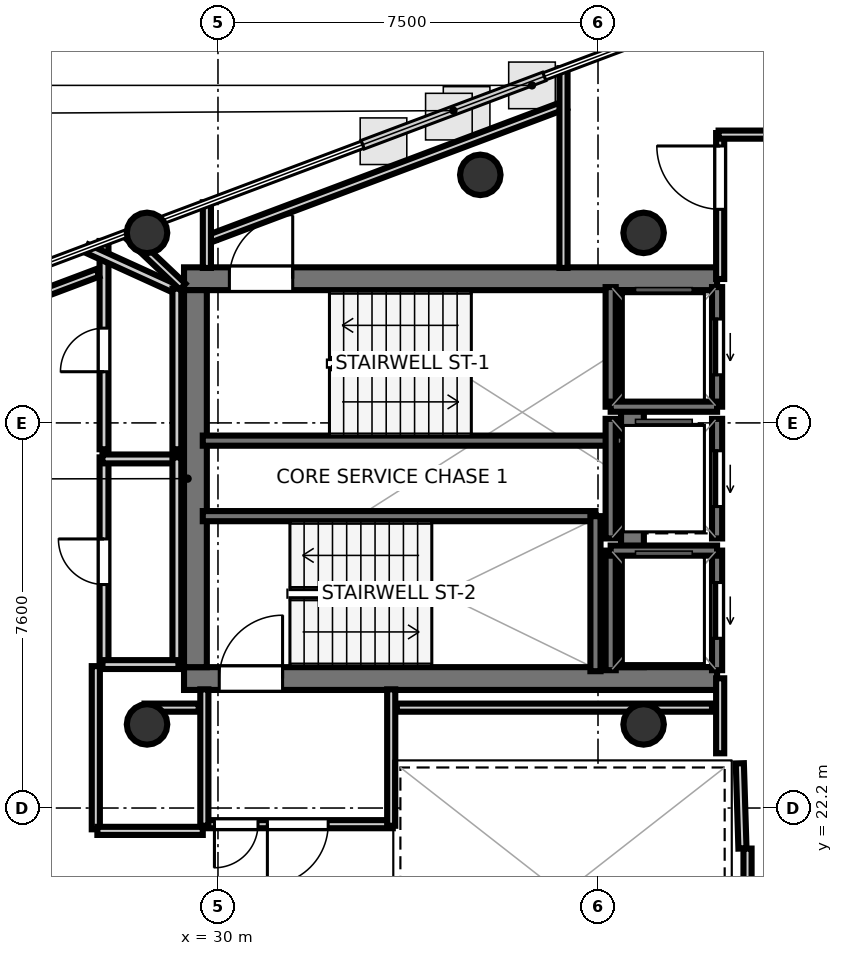
"""IFC4 building model, lengths in metres.
Left out: names, types, materials, properties, quantities, classifications, styles, units other than length and angle.
Written with IfcOpenShell. Run it as: python <this file> out.ifc"""

import sys

from ifc_helpers import new_model, si_unit, direction, frame, frame_2d, origin, origin_2d, place, context, subcontext, project, spatial, rectangle, hollow_circle, extrude, element, fill, save


model = new_model("IFC4")
c1 = context("Model", 3, precision=1e-05, world=origin(), true_north=direction((0.0, 1.0)))
c2 = subcontext(c1, "Body", "Model", "MODEL_VIEW")
j1 = project(units=[si_unit("LENGTHUNIT", "METRE"), si_unit("PLANEANGLEUNIT", "RADIAN")], contexts=[c1])
p1 = place(None, origin())
s1 = spatial("IfcSite", under=j1, at=p1, CompositionType="ELEMENT")
p2 = place(p1, origin())
s2 = spatial("IfcBuilding", under=s1, at=p2, CompositionType="ELEMENT")
p3 = place(p2, frame((0.0, 0.0, 340.7)))
s3 = spatial("IfcBuildingStorey", under=s2, at=p3, CompositionType="ELEMENT", Elevation=340.7)
p4 = place(p3, frame((29.33, 32.645, 0.0), z_axis=(0.0, 0.0, 1.0), x_axis=(1.0, 0.0, 0.0)))
e1 = element("IfcWall", 1, at=p4, inside=s3, PredefinedType="SHEAR", context=c2, shape_type="SweptSolid", body=[
    extrude(rectangle(XDim=10.52, YDim=0.45, at=frame_2d((5.26, 0.0))), origin(), (0.0, 0.0, 1.0), 3.52),
])
p5 = place(p4, frame((0.895, 0.0, 0.0)))
e2 = element("IfcOpeningElement", 2, at=p5, cuts=e1, PredefinedType="OPENING", context=c2, shape_type="SweptSolid", body=[
    extrude(rectangle(XDim=1.25, YDim=2.15, at=frame_2d((0.625, 1.075))), frame((0.0, 0.235, 0.0), z_axis=(0.0, -1.0, 0.0), x_axis=(1.0, 0.0, 0.0)), (0.0, 0.0, 1.0), 0.47),
])
p6 = place(p3, frame((29.33, 24.755, 0.0), z_axis=(0.0, 0.0, 1.0), x_axis=(1.0, 0.0, 0.0)))
e3 = element("IfcWall", 3, at=p6, inside=s3, PredefinedType="SHEAR", context=c2, shape_type="SweptSolid", body=[
    extrude(rectangle(XDim=10.52, YDim=0.45, at=frame_2d((5.26, 0.0))), origin(), (0.0, 0.0, 1.0), 3.52),
])
p7 = place(p6, frame((0.695, 0.0, 0.0)))
e4 = element("IfcOpeningElement", 4, at=p7, cuts=e3, PredefinedType="OPENING", context=c2, shape_type="SweptSolid", body=[
    extrude(rectangle(XDim=1.25, YDim=2.15, at=frame_2d((0.625, 1.075))), frame((0.0, 0.235, 0.0), z_axis=(0.0, -1.0, 0.0), x_axis=(1.0, 0.0, 0.0)), (0.0, 0.0, 1.0), 0.47),
])
for number, where, z_axis, x_axis in (
    (5, (29.555, 24.98, 0.0), (0.0, 0.0, 1.0), (0.0, 1.0, 0.0)),
    (6, (38.18, 24.98, 0.0), (0.0, 0.0, 1.0), (0.0, 1.0, 0.0)),
):
    element("IfcWall", number, at=place(p3, frame(where, z_axis=z_axis, x_axis=x_axis)), inside=s3, PredefinedType="SHEAR", context=c2, shape_type="SweptSolid", body=[
        extrude(rectangle(XDim=7.44, YDim=0.45, at=frame_2d((3.72, 0.0))), origin(), (0.0, 0.0, 1.0), 3.52),
    ])
for number, where, z_axis, x_axis in (
    (7, (28.6, 33.55, 0.0), (0.0, 0.0, 1.0), (1.0, 0.0, 0.0)),
    (8, (28.6, 23.85, 0.0), (0.0, 0.0, 1.0), (1.0, 0.0, 0.0)),
    (9, (38.4, 33.55, 0.0), (0.0, 0.0, 1.0), (1.0, 0.0, 0.0)),
    (10, (38.4, 23.85, 0.0), (0.0, 0.0, 1.0), (1.0, 0.0, 0.0)),
    (11, (35.177, 34.695, 0.0), (0.0, 0.0, 1.0), (1.0, 0.0, 0.0)),
):
    element("IfcColumn", number, at=place(p3, frame(where, z_axis=z_axis, x_axis=x_axis)), inside=s3, PredefinedType="COLUMN", context=c2, shape_type="SweptSolid", body=[
        extrude(hollow_circle(Radius=0.4, WallThickness=0.022, at=origin_2d()), origin(), (0.0, 0.0, 1.0), 3.7),
    ])
p8 = place(p3, frame((29.7, 29.45, 0.0), z_axis=(0.0, 0.0, 1.0), x_axis=(1.0, 0.0, 0.0)))
e12 = element("IfcWall", 12, at=p8, inside=s3, PredefinedType="SOLIDWALL", context=c2, shape_type="SweptSolid", body=[
    extrude(rectangle(XDim=8.3, YDim=0.2, at=frame_2d((4.15, 0.0))), origin(), (0.0, 0.0, 1.0), 3.52),
])
p9 = place(p3, frame((29.7, 27.96, 0.0), z_axis=(0.0, 0.0, 1.0), x_axis=(1.0, 0.0, 0.0)))
e13 = element("IfcWall", 13, at=p9, inside=s3, PredefinedType="SOLIDWALL", context=c2, shape_type="SweptSolid", body=[
    extrude(rectangle(XDim=7.75, YDim=0.2, at=frame_2d((3.875, 0.0))), origin(), (0.0, 0.0, 1.0), 3.52),
])
p10 = place(p3, frame((37.45, 24.9, 0.0), z_axis=(0.0, 0.0, 1.0), x_axis=(0.0, 1.0, 0.0)))
e14 = element("IfcWall", 14, at=p10, inside=s3, PredefinedType="SOLIDWALL", context=c2, shape_type="SweptSolid", body=[
    extrude(rectangle(XDim=3.06, YDim=0.2, at=frame_2d((1.53, 0.0))), origin(), (0.0, 0.0, 1.0), 3.52),
])
p11 = place(p3, frame((39.85, 30.12, 0.0), z_axis=(0.0, 0.0, 1.0), x_axis=(0.0, 1.0, 0.0)))
e15 = element("IfcWall", 15, at=p11, inside=s3, PredefinedType="SOLIDWALL", context=c2, shape_type="SweptSolid", body=[
    extrude(rectangle(XDim=2.36, YDim=0.2, at=frame_2d((1.18, 0.0))), origin(), (0.0, 0.0, 1.0), 3.52),
])
p12 = place(p11, frame((0.63, 0.0, 0.0)))
e16 = element("IfcOpeningElement", 16, at=p12, cuts=e15, PredefinedType="OPENING", context=c2, shape_type="SweptSolid", body=[
    extrude(rectangle(XDim=1.1, YDim=2.15, at=frame_2d((0.55, 1.075))), frame((0.0, 0.11, 0.0), z_axis=(0.0, -1.0, 0.0), x_axis=(1.0, 0.0, 0.0)), (0.0, 0.0, 1.0), 0.22),
])
p13 = place(p3, frame((37.75, 30.12, 0.0), z_axis=(0.0, 0.0, 1.0), x_axis=(0.0, 1.0, 0.0)))
e17 = element("IfcWall", 17, at=p13, inside=s3, PredefinedType="SOLIDWALL", context=c2, shape_type="SweptSolid", body=[
    extrude(rectangle(XDim=2.36, YDim=0.2, at=frame_2d((1.18, 0.0))), origin(), (0.0, 0.0, 1.0), 3.52),
])
p14 = place(p3, frame((37.75, 30.12, 0.0), z_axis=(0.0, 0.0, 1.0), x_axis=(1.0, 0.0, 0.0)))
e18 = element("IfcWall", 18, at=p14, inside=s3, PredefinedType="SOLIDWALL", context=c2, shape_type="SweptSolid", body=[
    extrude(rectangle(XDim=2.1, YDim=0.2, at=frame_2d((1.05, 0.0))), origin(), (0.0, 0.0, 1.0), 3.52),
])
p15 = place(p3, frame((39.85, 24.92, 0.0), z_axis=(0.0, 0.0, 1.0), x_axis=(0.0, 1.0, 0.0)))
e19 = element("IfcWall", 19, at=p15, inside=s3, PredefinedType="SOLIDWALL", context=c2, shape_type="SweptSolid", body=[
    extrude(rectangle(XDim=2.36, YDim=0.2, at=frame_2d((1.18, 0.0))), origin(), (0.0, 0.0, 1.0), 3.52),
])
p16 = place(p15, frame((0.63, 0.0, 0.0)))
e20 = element("IfcOpeningElement", 20, at=p16, cuts=e19, PredefinedType="OPENING", context=c2, shape_type="SweptSolid", body=[
    extrude(rectangle(XDim=1.1, YDim=2.15, at=frame_2d((0.55, 1.075))), frame((0.0, 0.11, 0.0), z_axis=(0.0, -1.0, 0.0), x_axis=(1.0, 0.0, 0.0)), (0.0, 0.0, 1.0), 0.22),
])
p17 = place(p3, frame((37.75, 24.92, 0.0), z_axis=(0.0, 0.0, 1.0), x_axis=(0.0, 1.0, 0.0)))
e21 = element("IfcWall", 21, at=p17, inside=s3, PredefinedType="SOLIDWALL", context=c2, shape_type="SweptSolid", body=[
    extrude(rectangle(XDim=2.36, YDim=0.2, at=frame_2d((1.18, 0.0))), origin(), (0.0, 0.0, 1.0), 3.52),
])
p18 = place(p3, frame((37.75, 27.28, 0.0), z_axis=(0.0, 0.0, 1.0), x_axis=(1.0, 0.0, 0.0)))
e22 = element("IfcWall", 22, at=p18, inside=s3, PredefinedType="SOLIDWALL", context=c2, shape_type="SweptSolid", body=[
    extrude(rectangle(XDim=2.1, YDim=0.2, at=frame_2d((1.05, 0.0))), origin(), (0.0, 0.0, 1.0), 3.52),
])
p19 = place(p3, frame((39.85, 27.52, 0.0), z_axis=(0.0, 0.0, 1.0), x_axis=(0.0, 1.0, 0.0)))
e23 = element("IfcWall", 23, at=p19, inside=s3, PredefinedType="SOLIDWALL", context=c2, shape_type="SweptSolid", body=[
    extrude(rectangle(XDim=2.36, YDim=0.2, at=frame_2d((1.18, 0.0))), origin(), (0.0, 0.0, 1.0), 3.52),
])
p20 = place(p19, frame((0.63, 0.0, 0.0)))
e24 = element("IfcOpeningElement", 24, at=p20, cuts=e23, PredefinedType="OPENING", context=c2, shape_type="SweptSolid", body=[
    extrude(rectangle(XDim=1.1, YDim=2.15, at=frame_2d((0.55, 1.075))), frame((0.0, 0.11, 0.0), z_axis=(0.0, -1.0, 0.0), x_axis=(1.0, 0.0, 0.0)), (0.0, 0.0, 1.0), 0.22),
])
p21 = place(p3, frame((37.75, 27.52, 0.0), z_axis=(0.0, 0.0, 1.0), x_axis=(0.0, 1.0, 0.0)))
e25 = element("IfcWall", 25, at=p21, inside=s3, PredefinedType="SOLIDWALL", context=c2, shape_type="SweptSolid", body=[
    extrude(rectangle(XDim=2.36, YDim=0.2, at=frame_2d((1.18, 0.0))), origin(), (0.0, 0.0, 1.0), 3.52),
])
p22 = place(p3, frame((29.761, 33.409, 0.0), z_axis=(0.0, 0.0, 1.0), x_axis=(0.936004712995, 0.351987467464, 0.0)))
e26 = element("IfcWall", 26, at=p22, inside=s3, PredefinedType="PARTITIONING", context=c2, shape_type="SweptSolid", body=[
    extrude(rectangle(XDim=7.585, YDim=0.16, at=frame_2d((3.792, 0.0))), origin(), (0.0, 0.0, 1.0), 2.84),
])
p23 = place(p3, frame((36.819, 36.8, 0.0), z_axis=(0.0, 0.0, 1.0), x_axis=(0.0, -1.0, 0.0)))
e27 = element("IfcWall", 27, at=p23, inside=s3, PredefinedType="PARTITIONING", context=c2, shape_type="SweptSolid", body=[
    extrude(rectangle(XDim=3.942, YDim=0.16, at=frame_2d((1.971, 0.0))), origin(), (0.0, 0.0, 1.0), 2.84),
])
p24 = place(p3, frame((29.781, 32.858, 0.0), z_axis=(0.0, 0.0, 1.0), x_axis=(0.0, 1.0, 0.0)))
e28 = element("IfcWall", 28, at=p24, inside=s3, PredefinedType="PARTITIONING", context=c2, shape_type="SweptSolid", body=[
    extrude(rectangle(XDim=1.296, YDim=0.16, at=frame_2d((0.648, 0.0))), origin(), (0.0, 0.0, 1.0), 2.84),
])
p25 = place(p3, frame((33.45, 21.881, 0.0), z_axis=(0.0, 0.0, 1.0), x_axis=(-1.0, 0.0, 0.0)))
e29 = element("IfcWall", 29, at=p25, inside=s3, PredefinedType="PARTITIONING", context=c2, shape_type="SweptSolid", body=[
    extrude(rectangle(XDim=3.75, YDim=0.16, at=frame_2d((1.875, 0.0))), origin(), (0.0, 0.0, 1.0), 2.84),
])
p26 = place(p25, frame((1.275, 0.0, 0.0)))
e30 = element("IfcOpeningElement", 30, at=p26, cuts=e29, PredefinedType="OPENING", context=c2, shape_type="SweptSolid", body=[
    extrude(rectangle(XDim=1.2, YDim=2.15, at=frame_2d((0.6, 1.075))), frame((0.0, 0.09, 0.0), z_axis=(0.0, -1.0, 0.0), x_axis=(1.0, 0.0, 0.0)), (0.0, 0.0, 1.0), 0.18),
])
p27 = place(p25, frame((2.66, 0.0, 0.0)))
e31 = element("IfcOpeningElement", 31, at=p27, cuts=e29, PredefinedType="OPENING", context=c2, shape_type="SweptSolid", body=[
    extrude(rectangle(XDim=0.86, YDim=2.05, at=frame_2d((0.43, 1.025))), frame((0.0, 0.09, 0.0), z_axis=(0.0, -1.0, 0.0), x_axis=(1.0, 0.0, 0.0)), (0.0, 0.0, 1.0), 0.18),
])
for number, where, z_axis, x_axis in (
    (32, (29.731, 21.85, 0.0), (0.0, 0.0, 1.0), (0.0, 1.0, 0.0)),
    (33, (33.419, 24.542, 0.0), (0.0, 0.0, 1.0), (0.0, -1.0, 0.0)),
):
    element("IfcWall", number, at=place(p3, frame(where, z_axis=z_axis, x_axis=x_axis)), inside=s3, PredefinedType="PARTITIONING", context=c2, shape_type="SweptSolid", body=[
        extrude(rectangle(XDim=2.692, YDim=0.16, at=frame_2d((1.346, 0.0))), origin(), (0.0, 0.0, 1.0), 2.84),
    ])
p28 = place(p3, frame((40.351, 21.401, 0.0), z_axis=(0.0, 0.0, 1.0), x_axis=(-0.031058045979, 0.999517582527, 0.0)))
e34 = element("IfcWall", 34, at=p28, inside=s3, PredefinedType="PARTITIONING", context=c2, shape_type="SweptSolid", body=[
    extrude(rectangle(XDim=1.682, YDim=0.16, at=frame_2d((0.841, 0.0))), origin(), (0.0, 0.0, 1.0), 2.84),
])
p29 = place(p3, frame((39.911, 23.28, 0.0), z_axis=(0.0, 0.0, 1.0), x_axis=(0.0, 1.0, 0.0)))
e35 = element("IfcWall", 35, at=p29, inside=s3, PredefinedType="PARTITIONING", context=c2, shape_type="SweptSolid", body=[
    extrude(rectangle(XDim=1.48, YDim=0.16, at=frame_2d((0.74, 0.0))), origin(), (0.0, 0.0, 1.0), 2.84),
])
p30 = place(p3, frame((39.911, 32.64, 0.0), z_axis=(0.0, 0.0, 1.0), x_axis=(0.0, 1.0, 0.0)))
e36 = element("IfcWall", 36, at=p30, inside=s3, PredefinedType="PARTITIONING", context=c2, shape_type="SweptSolid", body=[
    extrude(rectangle(XDim=2.88, YDim=0.16, at=frame_2d((1.44, 0.0))), origin(), (0.0, 0.0, 1.0), 2.84),
])
p31 = place(p30, frame((1.375, 0.0, 0.0)))
e37 = element("IfcOpeningElement", 37, at=p31, cuts=e36, PredefinedType="OPENING", context=c2, shape_type="SweptSolid", body=[
    extrude(rectangle(XDim=1.25, YDim=2.2, at=frame_2d((0.625, 1.1))), frame((0.0, 0.09, 0.0), z_axis=(0.0, -1.0, 0.0), x_axis=(1.0, 0.0, 0.0)), (0.0, 0.0, 1.0), 0.18),
])
p32 = place(p3, frame((39.88, 35.489, 0.0), z_axis=(0.0, 0.0, 1.0), x_axis=(1.0, 0.0, 0.0)))
e38 = element("IfcWall", 38, at=p32, inside=s3, PredefinedType="PARTITIONING", context=c2, shape_type="SweptSolid", body=[
    extrude(rectangle(XDim=1.48, YDim=0.16, at=frame_2d((0.74, 0.0))), origin(), (0.0, 0.0, 1.0), 2.84),
])
p33 = place(p3, frame((40.451, 18.08, 0.0), z_axis=(0.0, 0.0, 1.0), x_axis=(0.0, 1.0, 0.0)))
e39 = element("IfcWall", 39, at=p33, inside=s3, PredefinedType="PARTITIONING", context=c2, shape_type="SweptSolid", body=[
    extrude(rectangle(XDim=3.32, YDim=0.16, at=frame_2d((1.66, 0.0))), origin(), (0.0, 0.0, 1.0), 2.84),
])
p34 = place(p3, frame((27.751, 25.0, 0.0), z_axis=(0.0, 0.0, 1.0), x_axis=(0.0, 1.0, 0.0)))
e40 = element("IfcWall", 40, at=p34, inside=s3, PredefinedType="PLUMBINGWALL", context=c2, shape_type="SweptSolid", body=[
    extrude(rectangle(XDim=4.12, YDim=0.175, at=frame_2d((2.06, 0.0))), origin(), (0.0, 0.0, 1.0), 2.84),
])
p35 = place(p34, frame((1.61, 0.0, 0.0)))
e41 = element("IfcOpeningElement", 41, at=p35, cuts=e40, PredefinedType="OPENING", context=c2, shape_type="SweptSolid", body=[
    extrude(rectangle(XDim=0.9, YDim=2.1, at=frame_2d((0.45, 1.05))), frame((0.0, 0.097, 0.0), z_axis=(0.0, -1.0, 0.0), x_axis=(1.0, 0.0, 0.0)), (0.0, 0.0, 1.0), 0.195),
])
p36 = place(p3, frame((27.72, 29.089, 0.0), z_axis=(0.0, 0.0, 1.0), x_axis=(1.0, 0.0, 0.0)))
e42 = element("IfcWall", 42, at=p36, inside=s3, PredefinedType="PLUMBINGWALL", context=c2, shape_type="SweptSolid", body=[
    extrude(rectangle(XDim=1.5, YDim=0.175, at=frame_2d((0.75, 0.0))), origin(), (0.0, 0.0, 1.0), 2.84),
])
p37 = place(p3, frame((29.189, 29.12, 0.0), z_axis=(0.0, 0.0, 1.0), x_axis=(0.0, -1.0, 0.0)))
e43 = element("IfcWall", 43, at=p37, inside=s3, PredefinedType="PLUMBINGWALL", context=c2, shape_type="SweptSolid", body=[
    extrude(rectangle(XDim=4.12, YDim=0.175, at=frame_2d((2.06, 0.0))), origin(), (0.0, 0.0, 1.0), 2.84),
])
p38 = place(p3, frame((29.22, 25.031, 0.0), z_axis=(0.0, 0.0, 1.0), x_axis=(-1.0, 0.0, 0.0)))
e44 = element("IfcWall", 44, at=p38, inside=s3, PredefinedType="PLUMBINGWALL", context=c2, shape_type="SweptSolid", body=[
    extrude(rectangle(XDim=1.5, YDim=0.175, at=frame_2d((0.75, 0.0))), origin(), (0.0, 0.0, 1.0), 2.84),
])
p39 = place(p3, frame((27.751, 29.28, 0.0), z_axis=(0.0, 0.0, 1.0), x_axis=(0.0, 1.0, 0.0)))
e45 = element("IfcWall", 45, at=p39, inside=s3, PredefinedType="PLUMBINGWALL", context=c2, shape_type="SweptSolid", body=[
    extrude(rectangle(XDim=4.11, YDim=0.175, at=frame_2d((2.055, 0.0))), origin(), (0.0, 0.0, 1.0), 2.84),
])
p40 = place(p39, frame((1.53, 0.0, 0.0)))
e46 = element("IfcOpeningElement", 46, at=p40, cuts=e45, PredefinedType="OPENING", context=c2, shape_type="SweptSolid", body=[
    extrude(rectangle(XDim=0.86, YDim=2.05, at=frame_2d((0.43, 1.025))), frame((0.0, 0.097, 0.0), z_axis=(0.0, -1.0, 0.0), x_axis=(1.0, 0.0, 0.0)), (0.0, 0.0, 1.0), 0.195),
])
p41 = place(p3, frame((27.41, 33.242, 0.0), z_axis=(0.0, 0.0, 1.0), x_axis=(0.910231848318, -0.414099000611, 0.0)))
e47 = element("IfcWall", 47, at=p41, inside=s3, PredefinedType="PLUMBINGWALL", context=c2, shape_type="SweptSolid", body=[
    extrude(rectangle(XDim=1.988, YDim=0.175, at=frame_2d((0.994, 0.0))), origin(), (0.0, 0.0, 1.0), 2.84),
])
p42 = place(p3, frame((29.189, 32.45, 0.0), z_axis=(0.0, 0.0, 1.0), x_axis=(0.0, -1.0, 0.0)))
e48 = element("IfcWall", 48, at=p42, inside=s3, PredefinedType="PLUMBINGWALL", context=c2, shape_type="SweptSolid", body=[
    extrude(rectangle(XDim=3.17, YDim=0.175, at=frame_2d((1.585, 0.0))), origin(), (0.0, 0.0, 1.0), 2.84),
])
p43 = place(p3, frame((29.62, 24.181, 0.0), z_axis=(0.0, 0.0, 1.0), x_axis=(-1.0, 0.0, 0.0)))
e49 = element("IfcWall", 49, at=p43, inside=s3, PredefinedType="PARTITIONING", context=c2, shape_type="SweptSolid", body=[
    extrude(rectangle(XDim=1.07, YDim=0.16, at=frame_2d((0.535, 0.0))), origin(), (0.0, 0.0, 1.0), 2.84),
])
p44 = place(p3, frame((29.303, 32.489, 0.0), z_axis=(0.0, 0.0, 1.0), x_axis=(-0.726738102443, 0.686914645685, 0.0)))
e50 = element("IfcWall", 50, at=p44, inside=s3, PredefinedType="PARTITIONING", context=c2, shape_type="SweptSolid", body=[
    extrude(rectangle(XDim=1.527, YDim=0.16, at=frame_2d((0.763, 0.0))), origin(), (0.0, 0.0, 1.0), 2.84),
])
p45 = place(p3, frame((39.75, 24.181, 0.0), z_axis=(0.0, 0.0, 1.0), x_axis=(-1.0, 0.0, 0.0)))
e51 = element("IfcWall", 51, at=p45, inside=s3, PredefinedType="PARTITIONING", context=c2, shape_type="SweptSolid", body=[
    extrude(rectangle(XDim=6.22, YDim=0.16, at=frame_2d((3.11, 0.0))), origin(), (0.0, 0.0, 1.0), 2.84),
])
p46 = place(p3, frame((25.661, 32.022, 0.0), z_axis=(0.0, 0.0, 1.0), x_axis=(0.936018944995, 0.351949619422, 0.0)))
e52 = element("IfcWall", 52, at=p46, inside=s3, PredefinedType="PARTITIONING", context=c2, shape_type="SweptSolid", body=[
    extrude(rectangle(XDim=2.105, YDim=0.16, at=frame_2d((1.052, 0.0))), origin(), (0.0, 0.0, 1.0), 2.84),
])
p47 = place(p3, frame((27.589, 25.0, 0.0), z_axis=(0.0, 0.0, 1.0), x_axis=(0.0, -1.0, 0.0)))
e53 = element("IfcWall", 53, at=p47, inside=s3, PredefinedType="PARTITIONING", context=c2, shape_type="SweptSolid", body=[
    extrude(rectangle(XDim=3.22, YDim=0.16, at=frame_2d((1.61, 0.0))), origin(), (0.0, 0.0, 1.0), 2.84),
])
p48 = place(p3, frame((27.62, 21.749, 0.0), z_axis=(0.0, 0.0, 1.0), x_axis=(1.0, 0.0, 0.0)))
e54 = element("IfcWall", 54, at=p48, inside=s3, PredefinedType="PARTITIONING", context=c2, shape_type="SweptSolid", body=[
    extrude(rectangle(XDim=2.08, YDim=0.16, at=frame_2d((1.04, 0.0))), origin(), (0.0, 0.0, 1.0), 2.84),
])
p49 = place(p5, origin())
e55 = element("IfcDoor", 55, at=p49, inside=s3, OperationType="SINGLE_SWING_RIGHT", PredefinedType="DOOR", context=c2, shape_type="SweptSolid", body=[
    extrude(rectangle(XDim=1.25, YDim=2.15, at=frame_2d((0.625, 1.075))), frame((0.0, 0.025, 0.0), z_axis=(0.0, -1.0, 0.0), x_axis=(1.0, 0.0, 0.0)), (0.0, 0.0, 1.0), 0.05),
])
fill(e2, e55)
p50 = place(p7, origin())
e56 = element("IfcDoor", 56, at=p50, inside=s3, OperationType="SINGLE_SWING_RIGHT", PredefinedType="DOOR", context=c2, shape_type="SweptSolid", body=[
    extrude(rectangle(XDim=1.25, YDim=2.15, at=frame_2d((0.625, 1.075))), frame((0.0, 0.025, 0.0), z_axis=(0.0, -1.0, 0.0), x_axis=(1.0, 0.0, 0.0)), (0.0, 0.0, 1.0), 0.05),
])
fill(e4, e56)
p51 = place(p12, origin())
e57 = element("IfcDoor", 57, at=p51, inside=s3, OperationType="SLIDING_TO_LEFT", PredefinedType="DOOR", context=c2, shape_type="SweptSolid", body=[
    extrude(rectangle(XDim=1.1, YDim=2.15, at=frame_2d((0.55, 1.075))), frame((0.0, 0.025, 0.0), z_axis=(0.0, -1.0, 0.0), x_axis=(1.0, 0.0, 0.0)), (0.0, 0.0, 1.0), 0.05),
])
fill(e16, e57)
p52 = place(p16, origin())
e58 = element("IfcDoor", 58, at=p52, inside=s3, OperationType="SLIDING_TO_LEFT", PredefinedType="DOOR", context=c2, shape_type="SweptSolid", body=[
    extrude(rectangle(XDim=1.1, YDim=2.15, at=frame_2d((0.55, 1.075))), frame((0.0, 0.025, 0.0), z_axis=(0.0, -1.0, 0.0), x_axis=(1.0, 0.0, 0.0)), (0.0, 0.0, 1.0), 0.05),
])
fill(e20, e58)
p53 = place(p20, origin())
e59 = element("IfcDoor", 59, at=p53, inside=s3, OperationType="SLIDING_TO_LEFT", PredefinedType="DOOR", context=c2, shape_type="SweptSolid", body=[
    extrude(rectangle(XDim=1.1, YDim=2.15, at=frame_2d((0.55, 1.075))), frame((0.0, 0.025, 0.0), z_axis=(0.0, -1.0, 0.0), x_axis=(1.0, 0.0, 0.0)), (0.0, 0.0, 1.0), 0.05),
])
fill(e24, e59)
p54 = place(p26, origin())
e60 = element("IfcDoor", 60, at=p54, inside=s3, OperationType="SINGLE_SWING_RIGHT", PredefinedType="DOOR", context=c2, shape_type="SweptSolid", body=[
    extrude(rectangle(XDim=1.2, YDim=2.15, at=frame_2d((0.6, 1.075))), frame((0.0, 0.025, 0.0), z_axis=(0.0, -1.0, 0.0), x_axis=(1.0, 0.0, 0.0)), (0.0, 0.0, 1.0), 0.05),
])
fill(e30, e60)
p55 = place(p35, origin())
e61 = element("IfcDoor", 61, at=p55, inside=s3, OperationType="SINGLE_SWING_RIGHT", PredefinedType="DOOR", context=c2, shape_type="SweptSolid", body=[
    extrude(rectangle(XDim=0.9, YDim=2.1, at=frame_2d((0.45, 1.05))), frame((0.0, 0.025, 0.0), z_axis=(0.0, -1.0, 0.0), x_axis=(1.0, 0.0, 0.0)), (0.0, 0.0, 1.0), 0.05),
])
fill(e41, e61)
p56 = place(p40, origin())
e62 = element("IfcDoor", 62, at=p56, inside=s3, OperationType="SINGLE_SWING_LEFT", PredefinedType="DOOR", context=c2, shape_type="SweptSolid", body=[
    extrude(rectangle(XDim=0.86, YDim=2.05, at=frame_2d((0.43, 1.025))), frame((0.0, 0.025, 0.0), z_axis=(0.0, -1.0, 0.0), x_axis=(1.0, 0.0, 0.0)), (0.0, 0.0, 1.0), 0.05),
])
fill(e46, e62)
p57 = place(p27, origin())
e63 = element("IfcDoor", 63, at=p57, inside=s3, OperationType="SINGLE_SWING_RIGHT", PredefinedType="DOOR", context=c2, shape_type="SweptSolid", body=[
    extrude(rectangle(XDim=0.86, YDim=2.05, at=frame_2d((0.43, 1.025))), frame((0.0, 0.025, 0.0), z_axis=(0.0, -1.0, 0.0), x_axis=(1.0, 0.0, 0.0)), (0.0, 0.0, 1.0), 0.05),
])
fill(e31, e63)
p58 = place(p31, origin())
e64 = element("IfcDoor", 64, at=p58, inside=s3, OperationType="SINGLE_SWING_RIGHT", PredefinedType="DOOR", context=c2, shape_type="SweptSolid", body=[
    extrude(rectangle(XDim=1.25, YDim=2.2, at=frame_2d((0.625, 1.1))), frame((0.0, 0.025, 0.0), z_axis=(0.0, -1.0, 0.0), x_axis=(1.0, 0.0, 0.0)), (0.0, 0.0, 1.0), 0.05),
])
fill(e37, e64)
save(model, sys.argv[1])
